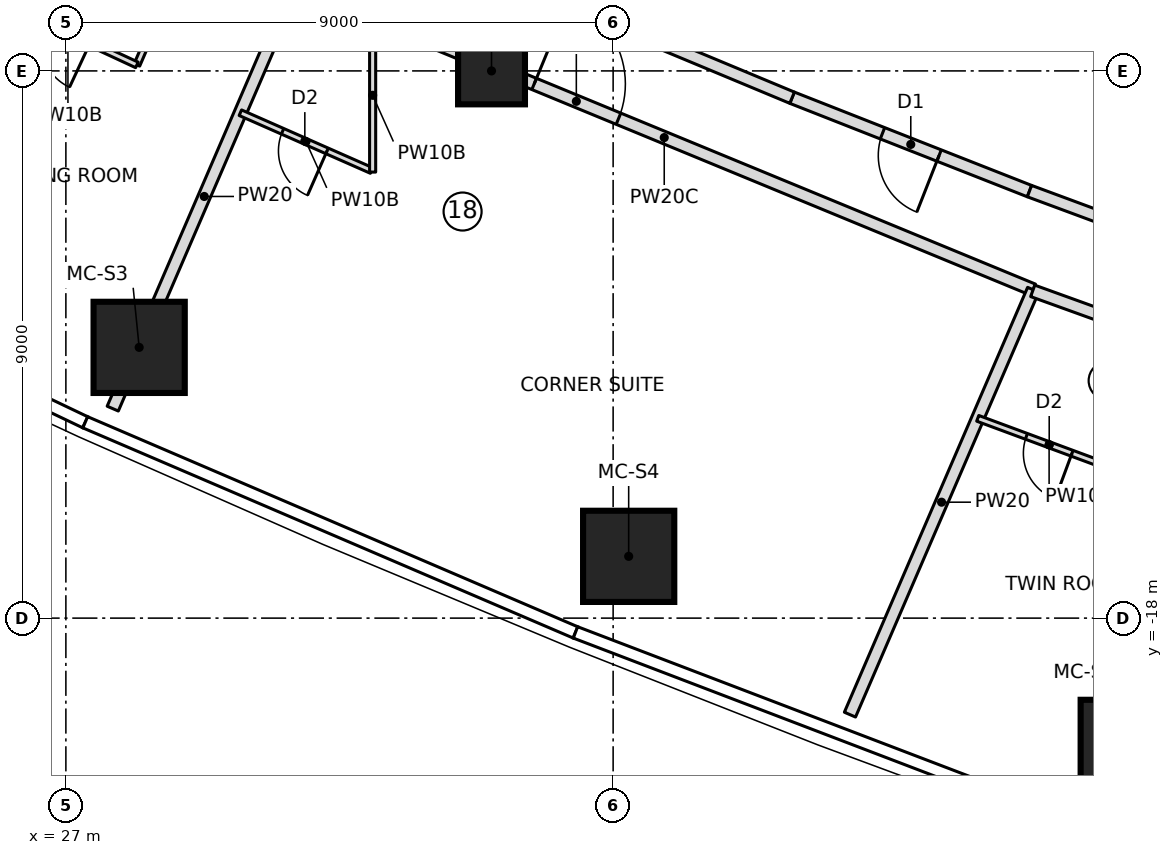
"""IFC4 building model, lengths in metres.
Left out: names, types, materials, properties, quantities, classifications, styles, units other than length and angle.
Written with IfcOpenShell. Run it as: python <this file> out.ifc"""

import sys

from ifc_helpers import new_model, si_unit, direction, frame, frame_2d, origin, origin_2d, place, context, subcontext, project, spatial, rectangle, extrude, element, fill, save


model = new_model("IFC4")
c1 = context("Model", 3, precision=1e-05, world=origin(), true_north=direction((0.0, 1.0)))
c2 = subcontext(c1, "Body", "Model", "MODEL_VIEW")
j1 = project(units=[si_unit("LENGTHUNIT", "METRE"), si_unit("PLANEANGLEUNIT", "RADIAN")], contexts=[c1])
p1 = place(None, origin())
s1 = spatial("IfcSite", under=j1, at=p1, CompositionType="ELEMENT")
p2 = place(p1, origin())
s2 = spatial("IfcBuilding", under=s1, at=p2, CompositionType="ELEMENT")
p3 = place(p2, frame((0.0, 0.0, 133.75)))
s3 = spatial("IfcBuildingStorey", under=s2, at=p3, CompositionType="ELEMENT", Elevation=133.75)
for number, where, z_axis, x_axis in (
    (1, (28.205, -13.547, 0.0), (0.0, 0.0, 1.0), (1.0, 0.0, 0.0)),
    (2, (36.256, -16.984, 0.0), (0.0, 0.0, 1.0), (1.0, 0.0, 0.0)),
    (3, (44.438, -20.093, 0.0), (0.0, 0.0, 1.0), (1.0, 0.0, 0.0)),
):
    element("IfcColumn", number, at=place(p3, frame(where, z_axis=z_axis, x_axis=x_axis)), inside=s3, PredefinedType="COLUMN", context=c2, shape_type="SweptSolid", body=[
        extrude(rectangle(XDim=1.5, YDim=1.5, at=origin_2d()), origin(), (0.0, 0.0, 1.0), 3.55),
    ])
p4 = place(p3, frame((34.0, -9.0, 0.0), z_axis=(0.0, 0.0, 1.0), x_axis=(1.0, 0.0, 0.0)))
e4 = element("IfcColumn", 4, at=p4, inside=s3, PredefinedType="COLUMN", context=c2, shape_type="SweptSolid", body=[
    extrude(rectangle(XDim=1.1, YDim=1.1, at=origin_2d()), origin(), (0.0, 0.0, 1.0), 3.55),
])
p5 = place(p3, frame((23.801, -12.716, 0.0), z_axis=(0.0, 0.0, 1.0), x_axis=(0.395995556294, 0.918252426839, 0.0)))
e5 = element("IfcWall", 5, at=p5, inside=s3, PredefinedType="PARTITIONING", context=c2, shape_type="SweptSolid", body=[
    extrude(rectangle(XDim=7.603, YDim=0.2, at=frame_2d((3.802, 0.0))), origin(), (0.0, 0.0, 1.0), 3.25),
])
p6 = place(p3, frame((29.07, -6.81, 0.0), z_axis=(0.0, 0.0, 1.0), x_axis=(-0.396000751487, -0.918250186399, 0.0)))
e6 = element("IfcWall", 6, at=p6, inside=s3, PredefinedType="PARTITIONING", context=c2, shape_type="SweptSolid", body=[
    extrude(rectangle(XDim=2.278, YDim=0.1, at=frame_2d((1.139, 0.0))), origin(), (0.0, 0.0, 1.0), 3.25),
])
p7 = place(p3, frame((28.168, -8.902, 0.0), z_axis=(0.0, 0.0, 1.0), x_axis=(-0.906813113059, 0.421532890751, 0.0)))
e7 = element("IfcWall", 7, at=p7, inside=s3, PredefinedType="PARTITIONING", context=c2, shape_type="SweptSolid", body=[
    extrude(rectangle(XDim=2.501, YDim=0.1, at=frame_2d((1.25, 0.0))), origin(), (0.0, 0.0, 1.0), 3.25),
])
p8 = place(p7, frame((0.85, 0.0, 0.0)))
e8 = element("IfcOpeningElement", 8, at=p8, cuts=e7, PredefinedType="OPENING", context=c2, shape_type="SweptSolid", body=[
    extrude(rectangle(XDim=0.8, YDim=2.1, at=frame_2d((0.4, 1.05))), frame((0.0, 0.06, 0.0), z_axis=(0.0, -1.0, 0.0), x_axis=(1.0, 0.0, 0.0)), (0.0, 0.0, 1.0), 0.12),
])
p9 = place(p3, frame((27.771, -14.554, 0.0), z_axis=(0.0, 0.0, 1.0), x_axis=(0.396004020147, 0.918248776763, 0.0)))
e9 = element("IfcWall", 9, at=p9, inside=s3, PredefinedType="PARTITIONING", context=c2, shape_type="SweptSolid", body=[
    extrude(rectangle(XDim=7.6, YDim=0.2, at=frame_2d((3.8, 0.0))), origin(), (0.0, 0.0, 1.0), 3.25),
])
p10 = place(p3, frame((30.772, -7.594, 0.0), z_axis=(0.0, 0.0, 1.0), x_axis=(0.924461873383, -0.381274500407, 0.0)))
e10 = element("IfcWall", 10, at=p10, inside=s3, PredefinedType="PARTITIONING", context=c2, shape_type="SweptSolid", body=[
    extrude(rectangle(XDim=13.127, YDim=0.2, at=frame_2d((6.564, 0.0))), origin(), (0.0, 0.0, 1.0), 3.25),
])
p11 = place(p10, frame((4.25, 0.0, 0.0)))
e11 = element("IfcOpeningElement", 11, at=p11, cuts=e10, PredefinedType="OPENING", context=c2, shape_type="SweptSolid", body=[
    extrude(rectangle(XDim=1.5, YDim=2.1, at=frame_2d((0.75, 1.05))), frame((0.0, 0.11, 0.0), z_axis=(0.0, -1.0, 0.0), x_axis=(1.0, 0.0, 0.0)), (0.0, 0.0, 1.0), 0.22),
])
p12 = place(p3, frame((32.028, -10.638, 0.0), z_axis=(0.0, 0.0, 1.0), x_axis=(-0.915108845766, 0.403206895278, 0.0)))
e12 = element("IfcWall", 12, at=p12, inside=s3, PredefinedType="PARTITIONING", context=c2, shape_type="SweptSolid", body=[
    extrude(rectangle(XDim=2.358, YDim=0.1, at=frame_2d((1.179, 0.0))), origin(), (0.0, 0.0, 1.0), 3.25),
])
p13 = place(p12, frame((0.8, 0.0, 0.0)))
e13 = element("IfcOpeningElement", 13, at=p13, cuts=e12, PredefinedType="OPENING", context=c2, shape_type="SweptSolid", body=[
    extrude(rectangle(XDim=0.8, YDim=2.1, at=frame_2d((0.4, 1.05))), frame((0.0, 0.06, 0.0), z_axis=(0.0, -1.0, 0.0), x_axis=(1.0, 0.0, 0.0)), (0.0, 0.0, 1.0), 0.12),
])
p14 = place(p3, frame((39.895, -19.587, 0.0), z_axis=(0.0, 0.0, 1.0), x_axis=(0.395993528256, 0.918253301426, 0.0)))
e14 = element("IfcWall", 14, at=p14, inside=s3, PredefinedType="PARTITIONING", context=c2, shape_type="SweptSolid", body=[
    extrude(rectangle(XDim=7.61, YDim=0.2, at=frame_2d((3.805, 0.0))), origin(), (0.0, 0.0, 1.0), 3.25),
])
p15 = place(p3, frame((42.9, -12.617, 0.0), z_axis=(0.0, 0.0, 1.0), x_axis=(0.940555877924, -0.339638985546, 0.0)))
e15 = element("IfcWall", 15, at=p15, inside=s3, PredefinedType="PARTITIONING", context=c2, shape_type="SweptSolid", body=[
    extrude(rectangle(XDim=4.381, YDim=0.2, at=frame_2d((2.19, 0.0))), origin(), (0.0, 0.0, 1.0), 3.25),
])
p16 = place(p15, frame((3.05, 0.0, 0.0)))
e16 = element("IfcOpeningElement", 16, at=p16, cuts=e15, PredefinedType="OPENING", context=c2, shape_type="SweptSolid", body=[
    extrude(rectangle(XDim=1.0, YDim=2.1, at=frame_2d((0.5, 1.05))), frame((0.0, 0.11, 0.0), z_axis=(0.0, -1.0, 0.0), x_axis=(1.0, 0.0, 0.0)), (0.0, 0.0, 1.0), 0.22),
])
p17 = place(p3, frame((44.344, -15.583, 0.0), z_axis=(0.0, 0.0, 1.0), x_axis=(-0.937752290113, 0.347304826323, 0.0)))
e17 = element("IfcWall", 17, at=p17, inside=s3, PredefinedType="PARTITIONING", context=c2, shape_type="SweptSolid", body=[
    extrude(rectangle(XDim=2.503, YDim=0.1, at=frame_2d((1.251, 0.0))), origin(), (0.0, 0.0, 1.0), 3.25),
])
p18 = place(p17, frame((0.85, 0.0, 0.0)))
e18 = element("IfcOpeningElement", 18, at=p18, cuts=e17, PredefinedType="OPENING", context=c2, shape_type="SweptSolid", body=[
    extrude(rectangle(XDim=0.8, YDim=2.1, at=frame_2d((0.4, 1.05))), frame((0.0, 0.06, 0.0), z_axis=(0.0, -1.0, 0.0), x_axis=(1.0, 0.0, 0.0)), (0.0, 0.0, 1.0), 0.12),
])
p19 = place(p3, frame((42.847, -10.977, 0.0), z_axis=(0.0, 0.0, 1.0), x_axis=(-0.930576677263, 0.36609704688, 0.0)))
e19 = element("IfcWall", 19, at=p19, inside=s3, PredefinedType="PARTITIONING", context=c2, shape_type="SweptSolid", body=[
    extrude(rectangle(XDim=4.195, YDim=0.2, at=frame_2d((2.098, 0.0))), origin(), (0.0, 0.0, 1.0), 3.25),
])
p20 = place(p19, frame((1.598, 0.0, 0.0)))
e20 = element("IfcOpeningElement", 20, at=p20, cuts=e19, PredefinedType="OPENING", context=c2, shape_type="SweptSolid", body=[
    extrude(rectangle(XDim=1.0, YDim=2.1, at=frame_2d((0.5, 1.05))), frame((0.0, 0.11, 0.0), z_axis=(0.0, -1.0, 0.0), x_axis=(1.0, 0.0, 0.0)), (0.0, 0.0, 1.0), 0.22),
])
p21 = place(p3, frame((46.781, -12.434, 0.0), z_axis=(0.0, 0.0, 1.0), x_axis=(-0.937732614305, 0.347357948044, 0.0)))
e21 = element("IfcWall", 21, at=p21, inside=s3, PredefinedType="PARTITIONING", context=c2, shape_type="SweptSolid", body=[
    extrude(rectangle(XDim=4.195, YDim=0.2, at=frame_2d((2.098, 0.0))), origin(), (0.0, 0.0, 1.0), 3.25),
])
p22 = place(p3, frame((38.943, -9.441, 0.0), z_axis=(0.0, 0.0, 1.0), x_axis=(-0.923008963065, 0.384778448073, 0.0)))
e22 = element("IfcWall", 22, at=p22, inside=s3, PredefinedType="PARTITIONING", context=c2, shape_type="SweptSolid", body=[
    extrude(rectangle(XDim=2.339, YDim=0.2, at=frame_2d((1.169, 0.0))), origin(), (0.0, 0.0, 1.0), 3.25),
])
p23 = place(p3, frame((32.045, -8.138, 0.0), z_axis=(0.0, 0.0, 1.0), x_axis=(0.0, -1.0, 0.0)))
e23 = element("IfcWall", 23, at=p23, inside=s3, PredefinedType="PARTITIONING", context=c2, shape_type="SweptSolid", body=[
    extrude(rectangle(XDim=2.526, YDim=0.1, at=frame_2d((1.263, 0.0))), origin(), (0.0, 0.0, 1.0), 3.25),
])
p24 = place(p13, origin())
e24 = element("IfcDoor", 24, at=p24, inside=s3, OperationType="SINGLE_SWING_LEFT", PredefinedType="DOOR", context=c2, shape_type="SweptSolid", body=[
    extrude(rectangle(XDim=0.8, YDim=2.1, at=frame_2d((0.4, 1.05))), frame((0.0, 0.025, 0.0), z_axis=(0.0, -1.0, 0.0), x_axis=(1.0, 0.0, 0.0)), (0.0, 0.0, 1.0), 0.05),
])
fill(e13, e24)
p25 = place(p11, origin())
e25 = element("IfcDoor", 25, at=p25, inside=s3, OperationType="DOUBLE_DOOR_SINGLE_SWING", PredefinedType="DOOR", context=c2, shape_type="SweptSolid", body=[
    extrude(rectangle(XDim=1.5, YDim=2.1, at=frame_2d((0.75, 1.05))), frame((0.0, 0.025, 0.0), z_axis=(0.0, -1.0, 0.0), x_axis=(1.0, 0.0, 0.0)), (0.0, 0.0, 1.0), 0.05),
])
fill(e11, e25)
p26 = place(p18, origin())
e26 = element("IfcDoor", 26, at=p26, inside=s3, OperationType="SINGLE_SWING_LEFT", PredefinedType="DOOR", context=c2, shape_type="SweptSolid", body=[
    extrude(rectangle(XDim=0.8, YDim=2.1, at=frame_2d((0.4, 1.05))), frame((0.0, 0.025, 0.0), z_axis=(0.0, -1.0, 0.0), x_axis=(1.0, 0.0, 0.0)), (0.0, 0.0, 1.0), 0.05),
])
fill(e18, e26)
p27 = place(p20, origin())
e27 = element("IfcDoor", 27, at=p27, inside=s3, OperationType="SINGLE_SWING_LEFT", PredefinedType="DOOR", context=c2, shape_type="SweptSolid", body=[
    extrude(rectangle(XDim=1.0, YDim=2.1, at=frame_2d((0.5, 1.05))), frame((0.0, 0.025, 0.0), z_axis=(0.0, -1.0, 0.0), x_axis=(1.0, 0.0, 0.0)), (0.0, 0.0, 1.0), 0.05),
])
fill(e20, e27)
save(model, sys.argv[1])
